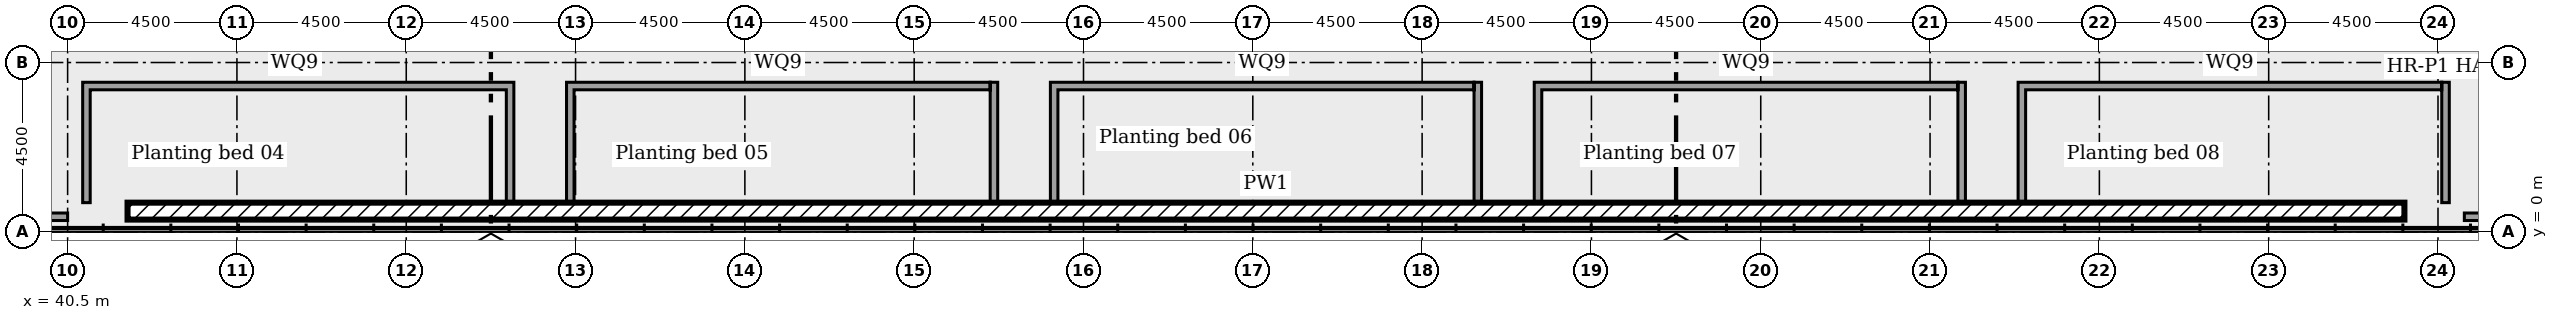
"""IFC4 building model, lengths in metres.
Left out: names, types, materials, properties, quantities, classifications, styles, units other than length and angle.
Written with IfcOpenShell. Run it as: python <this file> out.ifc"""

import sys

from ifc_helpers import new_model, si_unit, direction, frame, frame_2d, origin, place, context, subcontext, project, spatial, rectangle, extrude, element, save


model = new_model("IFC4")
c1 = context("Model", 3, precision=1e-05, world=origin(), true_north=direction((0.0, 1.0)))
c2 = subcontext(c1, "Body", "Model", "MODEL_VIEW")
j1 = project(units=[si_unit("LENGTHUNIT", "METRE"), si_unit("PLANEANGLEUNIT", "RADIAN")], contexts=[c1])
p1 = place(None, origin())
s1 = spatial("IfcSite", under=j1, at=p1, CompositionType="ELEMENT")
p2 = place(p1, origin())
s2 = spatial("IfcBuilding", under=s1, at=p2, CompositionType="ELEMENT")
p3 = place(p2, frame((0.0, 0.0, 6.0)))
s3 = spatial("IfcBuildingStorey", under=s2, at=p3, CompositionType="ELEMENT", Elevation=6.0)
p4 = place(p3, frame((42.093, 0.55, 0.0)))
e1 = element("IfcWall", 1, at=p4, inside=s3, PredefinedType="SOLIDWALL", context=c2, shape_type="SweptSolid", body=[
    extrude(rectangle(XDim=60.515, YDim=0.45, at=frame_2d((30.257, 0.0))), origin(), (0.0, 0.0, 1.0), 0.6),
])
p5 = place(p3, frame((52.26, 0.775, 0.0), z_axis=(0.0, 0.0, 1.0), x_axis=(0.0, 1.0, 0.0)))
e2 = element("IfcWall", 2, at=p5, inside=s3, PredefinedType="SOLIDWALL", context=c2, shape_type="SweptSolid", body=[
    extrude(rectangle(XDim=3.2, YDim=0.2, at=frame_2d((1.6, 0.0))), origin(), (0.0, 0.0, 1.0), 0.45),
])
p6 = place(p3, frame((40.9, 3.875, 0.0)))
e3 = element("IfcWall", 3, at=p6, inside=s3, PredefinedType="SOLIDWALL", context=c2, shape_type="SweptSolid", body=[
    extrude(rectangle(XDim=11.26, YDim=0.2, at=frame_2d((5.63, 0.0))), origin(), (0.0, 0.0, 1.0), 0.45),
])
p7 = place(p3, frame((41.0, 0.775, 0.0), z_axis=(0.0, 0.0, 1.0), x_axis=(0.0, 1.0, 0.0)))
e4 = element("IfcWall", 4, at=p7, inside=s3, PredefinedType="SOLIDWALL", context=c2, shape_type="SweptSolid", body=[
    extrude(rectangle(XDim=3.0, YDim=0.2, at=frame_2d((1.5, 0.0))), origin(), (0.0, 0.0, 1.0), 0.45),
])
p8 = place(p3, frame((65.12, 0.775, 0.0), z_axis=(0.0, 0.0, 1.0), x_axis=(0.0, 1.0, 0.0)))
e5 = element("IfcWall", 5, at=p8, inside=s3, PredefinedType="SOLIDWALL", context=c2, shape_type="SweptSolid", body=[
    extrude(rectangle(XDim=3.2, YDim=0.2, at=frame_2d((1.6, 0.0))), origin(), (0.0, 0.0, 1.0), 0.45),
])
p9 = place(p3, frame((53.76, 3.875, 0.0)))
e6 = element("IfcWall", 6, at=p9, inside=s3, PredefinedType="SOLIDWALL", context=c2, shape_type="SweptSolid", body=[
    extrude(rectangle(XDim=11.26, YDim=0.2, at=frame_2d((5.63, 0.0))), origin(), (0.0, 0.0, 1.0), 0.45),
])
p10 = place(p3, frame((53.86, 0.775, 0.0), z_axis=(0.0, 0.0, 1.0), x_axis=(0.0, 1.0, 0.0)))
e7 = element("IfcWall", 7, at=p10, inside=s3, PredefinedType="SOLIDWALL", context=c2, shape_type="SweptSolid", body=[
    extrude(rectangle(XDim=3.0, YDim=0.2, at=frame_2d((1.5, 0.0))), origin(), (0.0, 0.0, 1.0), 0.45),
])
p11 = place(p3, frame((77.98, 0.775, 0.0), z_axis=(0.0, 0.0, 1.0), x_axis=(0.0, 1.0, 0.0)))
e8 = element("IfcWall", 8, at=p11, inside=s3, PredefinedType="SOLIDWALL", context=c2, shape_type="SweptSolid", body=[
    extrude(rectangle(XDim=3.2, YDim=0.2, at=frame_2d((1.6, 0.0))), origin(), (0.0, 0.0, 1.0), 0.45),
])
p12 = place(p3, frame((66.62, 3.875, 0.0)))
e9 = element("IfcWall", 9, at=p12, inside=s3, PredefinedType="SOLIDWALL", context=c2, shape_type="SweptSolid", body=[
    extrude(rectangle(XDim=11.26, YDim=0.2, at=frame_2d((5.63, 0.0))), origin(), (0.0, 0.0, 1.0), 0.45),
])
p13 = place(p3, frame((66.72, 0.775, 0.0), z_axis=(0.0, 0.0, 1.0), x_axis=(0.0, 1.0, 0.0)))
e10 = element("IfcWall", 10, at=p13, inside=s3, PredefinedType="SOLIDWALL", context=c2, shape_type="SweptSolid", body=[
    extrude(rectangle(XDim=3.0, YDim=0.2, at=frame_2d((1.5, 0.0))), origin(), (0.0, 0.0, 1.0), 0.45),
])
p14 = place(p3, frame((90.84, 0.775, 0.0), z_axis=(0.0, 0.0, 1.0), x_axis=(0.0, 1.0, 0.0)))
e11 = element("IfcWall", 11, at=p14, inside=s3, PredefinedType="SOLIDWALL", context=c2, shape_type="SweptSolid", body=[
    extrude(rectangle(XDim=3.2, YDim=0.2, at=frame_2d((1.6, 0.0))), origin(), (0.0, 0.0, 1.0), 0.45),
])
p15 = place(p3, frame((79.48, 3.875, 0.0)))
e12 = element("IfcWall", 12, at=p15, inside=s3, PredefinedType="SOLIDWALL", context=c2, shape_type="SweptSolid", body=[
    extrude(rectangle(XDim=11.26, YDim=0.2, at=frame_2d((5.63, 0.0))), origin(), (0.0, 0.0, 1.0), 0.45),
])
p16 = place(p3, frame((79.58, 0.775, 0.0), z_axis=(0.0, 0.0, 1.0), x_axis=(0.0, 1.0, 0.0)))
e13 = element("IfcWall", 13, at=p16, inside=s3, PredefinedType="SOLIDWALL", context=c2, shape_type="SweptSolid", body=[
    extrude(rectangle(XDim=3.0, YDim=0.2, at=frame_2d((1.5, 0.0))), origin(), (0.0, 0.0, 1.0), 0.45),
])
p17 = place(p3, frame((103.7, 0.775, 0.0), z_axis=(0.0, 0.0, 1.0), x_axis=(0.0, 1.0, 0.0)))
e14 = element("IfcWall", 14, at=p17, inside=s3, PredefinedType="SOLIDWALL", context=c2, shape_type="SweptSolid", body=[
    extrude(rectangle(XDim=3.2, YDim=0.2, at=frame_2d((1.6, 0.0))), origin(), (0.0, 0.0, 1.0), 0.45),
])
p18 = place(p3, frame((92.34, 3.875, 0.0)))
e15 = element("IfcWall", 15, at=p18, inside=s3, PredefinedType="SOLIDWALL", context=c2, shape_type="SweptSolid", body=[
    extrude(rectangle(XDim=11.26, YDim=0.2, at=frame_2d((5.63, 0.0))), origin(), (0.0, 0.0, 1.0), 0.45),
])
p19 = place(p3, frame((92.44, 0.775, 0.0), z_axis=(0.0, 0.0, 1.0), x_axis=(0.0, 1.0, 0.0)))
e16 = element("IfcWall", 16, at=p19, inside=s3, PredefinedType="SOLIDWALL", context=c2, shape_type="SweptSolid", body=[
    extrude(rectangle(XDim=3.0, YDim=0.2, at=frame_2d((1.5, 0.0))), origin(), (0.0, 0.0, 1.0), 0.45),
])
p20 = place(p3, frame((36.7, 0.4, 0.0)))
e17 = element("IfcWall", 17, at=p20, inside=s3, PredefinedType="SOLIDWALL", context=c2, shape_type="SweptSolid", body=[
    extrude(rectangle(XDim=3.8, YDim=0.2, at=frame_2d((1.9, 0.0))), origin(), (0.0, 0.0, 1.0), 2.3),
])
p21 = place(p20, frame((0.6, 0.0, 0.0)))
e18 = element("IfcOpeningElement", 18, at=p21, cuts=e17, PredefinedType="OPENING", context=c2, shape_type="SweptSolid", body=[
    extrude(rectangle(XDim=2.6, YDim=2.1, at=frame_2d((1.3, 1.05))), frame((0.0, 0.11, 0.0), z_axis=(0.0, -1.0, 0.0), x_axis=(1.0, 0.0, 0.0)), (0.0, 0.0, 1.0), 0.22),
])
p22 = place(p3, frame((104.2, 0.4, 0.0)))
e19 = element("IfcWall", 19, at=p22, inside=s3, PredefinedType="SOLIDWALL", context=c2, shape_type="SweptSolid", body=[
    extrude(rectangle(XDim=3.8, YDim=0.2, at=frame_2d((1.9, 0.0))), origin(), (0.0, 0.0, 1.0), 2.3),
])
p23 = place(p22, frame((0.6, 0.0, 0.0)))
e20 = element("IfcOpeningElement", 20, at=p23, cuts=e19, PredefinedType="OPENING", context=c2, shape_type="SweptSolid", body=[
    extrude(rectangle(XDim=2.6, YDim=2.1, at=frame_2d((1.3, 1.05))), frame((0.0, 0.11, 0.0), z_axis=(0.0, -1.0, 0.0), x_axis=(1.0, 0.0, 0.0)), (0.0, 0.0, 1.0), 0.22),
])
save(model, sys.argv[1])
